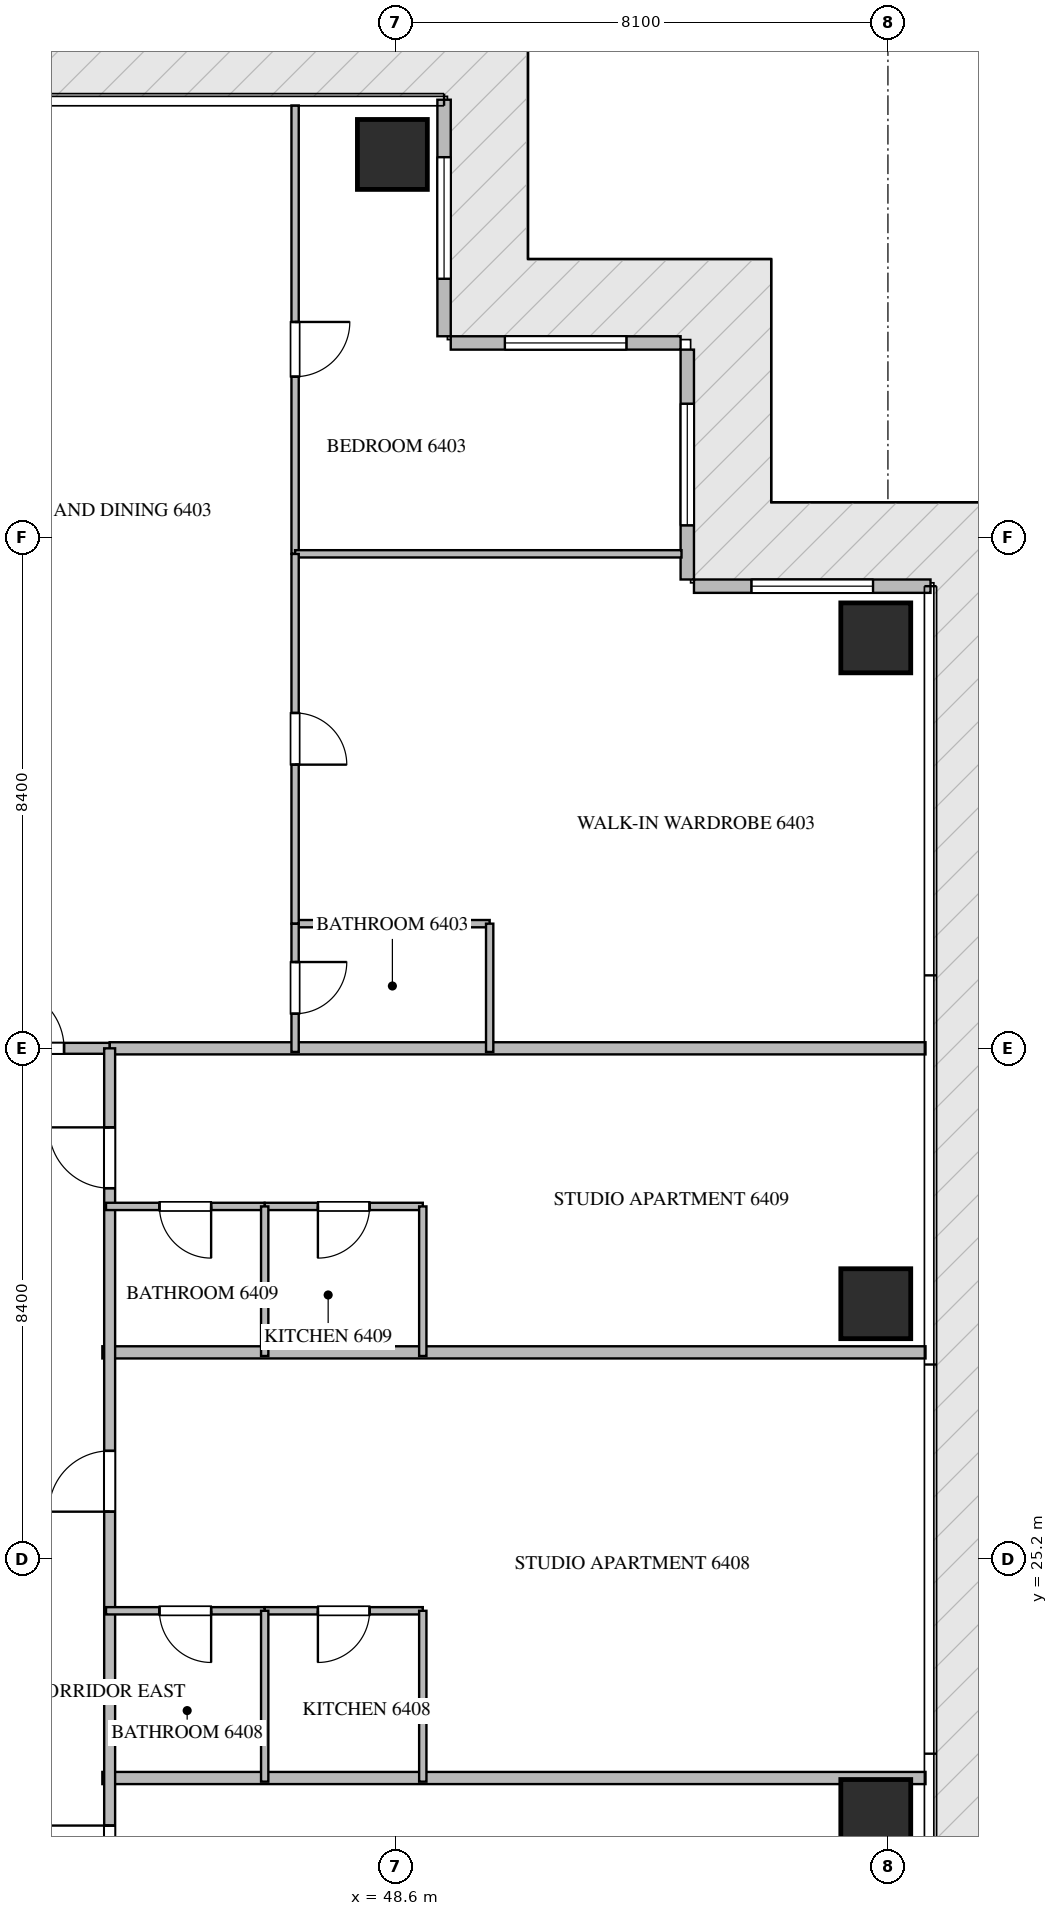
"""IFC4 building model, lengths in metres.
Left out: names, types, materials, properties, quantities, classifications, styles, units other than length and angle.
Written with IfcOpenShell. Run it as: python <this file> out.ifc"""

import sys

from ifc_helpers import new_model, si_unit, direction, frame, frame_2d, origin, origin_2d, place, context, subcontext, project, spatial, rectangle, extrude, source, transform, mapped, element, fill, save


model = new_model("IFC4")
c1 = context("Model", 3, precision=1e-05, world=origin(), true_north=direction((0.0, 1.0)))
c2 = subcontext(c1, "Body", "Model", "MODEL_VIEW")
j1 = project(units=[si_unit("LENGTHUNIT", "METRE"), si_unit("PLANEANGLEUNIT", "RADIAN")], contexts=[c1])
p1 = place(None, origin())
s1 = spatial("IfcSite", under=j1, at=p1, CompositionType="ELEMENT")
p2 = place(p1, origin())
s2 = spatial("IfcBuilding", under=s1, at=p2, CompositionType="ELEMENT")
p3 = place(p2, frame((0.0, 0.0, 256.65)))
s3 = spatial("IfcBuildingStorey", under=s2, at=p3, CompositionType="ELEMENT", Elevation=256.65)
m1 = source(origin(), c2, "Body", "SweptSolid", [
    extrude(rectangle(XDim=1.15, YDim=1.15, at=origin_2d()), origin(), (0.0, 0.0, 1.0), 3.85),
])
for number, where, z_axis, x_axis in (
    (1, (48.55, 48.3, -0.26), (0.0, 0.0, 1.0), (1.0, 0.0, 0.0)),
    (2, (56.5, 21.0, -0.26), (0.0, 0.0, 1.0), (1.0, 0.0, 0.0)),
    (3, (56.5, 29.4, -0.26), (0.0, 0.0, 1.0), (1.0, 0.0, 0.0)),
    (4, (56.5, 40.35, -0.26), (0.0, 0.0, 1.0), (1.0, 0.0, 0.0)),
):
    element("IfcColumn", number, at=place(p3, frame(where, z_axis=z_axis, x_axis=x_axis)), inside=s3, PredefinedType="COLUMN", context=c2, shape_type="MappedRepresentation", body=[
        mapped(m1, transform((0.0, 0.0, 0.0), scale=1.0)),
    ])
p4 = place(p3, frame((57.4, 41.2, 0.0), z_axis=(0.0, 0.0, 1.0), x_axis=(-1.0, 0.0, 0.0)))
e5 = element("IfcWall", 5, at=p4, inside=s3, PredefinedType="ELEMENTEDWALL", context=c2, shape_type="SweptSolid", body=[
    extrude(rectangle(XDim=3.89, YDim=0.22, at=frame_2d((1.945, 0.0))), origin(), (0.0, 0.0, 1.0), 3.575),
])
p5 = place(p4, frame((0.945, 0.0, 0.65)))
e6 = element("IfcOpeningElement", 6, at=p5, cuts=e5, PredefinedType="OPENING", context=c2, shape_type="SweptSolid", body=[
    extrude(rectangle(XDim=2.0, YDim=2.2, at=frame_2d((1.0, 1.1))), frame((0.0, 0.12, 0.0), z_axis=(0.0, -1.0, 0.0), x_axis=(1.0, 0.0, 0.0)), (0.0, 0.0, 1.0), 0.24),
])
p6 = place(p3, frame((53.4, 41.31, 0.0), z_axis=(0.0, 0.0, 1.0), x_axis=(0.0, 1.0, 0.0)))
e7 = element("IfcWall", 7, at=p6, inside=s3, PredefinedType="ELEMENTEDWALL", context=c2, shape_type="SweptSolid", body=[
    extrude(rectangle(XDim=3.78, YDim=0.22, at=frame_2d((1.89, 0.0))), origin(), (0.0, 0.0, 1.0), 3.575),
])
p7 = place(p6, frame((0.89, 0.0, 0.65)))
e8 = element("IfcOpeningElement", 8, at=p7, cuts=e7, PredefinedType="OPENING", context=c2, shape_type="SweptSolid", body=[
    extrude(rectangle(XDim=2.0, YDim=2.2, at=frame_2d((1.0, 1.1))), frame((0.0, 0.12, 0.0), z_axis=(0.0, -1.0, 0.0), x_axis=(1.0, 0.0, 0.0)), (0.0, 0.0, 1.0), 0.24),
])
p8 = place(p3, frame((53.29, 45.2, 0.0), z_axis=(0.0, 0.0, 1.0), x_axis=(-1.0, 0.0, 0.0)))
e9 = element("IfcWall", 9, at=p8, inside=s3, PredefinedType="ELEMENTEDWALL", context=c2, shape_type="SweptSolid", body=[
    extrude(rectangle(XDim=3.78, YDim=0.22, at=frame_2d((1.89, 0.0))), origin(), (0.0, 0.0, 1.0), 3.575),
])
p9 = place(p8, frame((0.89, 0.0, 0.65)))
e10 = element("IfcOpeningElement", 10, at=p9, cuts=e9, PredefinedType="OPENING", context=c2, shape_type="SweptSolid", body=[
    extrude(rectangle(XDim=2.0, YDim=2.2, at=frame_2d((1.0, 1.1))), frame((0.0, 0.12, 0.0), z_axis=(0.0, -1.0, 0.0), x_axis=(1.0, 0.0, 0.0)), (0.0, 0.0, 1.0), 0.24),
])
p10 = place(p3, frame((49.4, 45.31, 0.0), z_axis=(0.0, 0.0, 1.0), x_axis=(0.0, 1.0, 0.0)))
e11 = element("IfcWall", 11, at=p10, inside=s3, PredefinedType="ELEMENTEDWALL", context=c2, shape_type="SweptSolid", body=[
    extrude(rectangle(XDim=3.89, YDim=0.22, at=frame_2d((1.945, 0.0))), origin(), (0.0, 0.0, 1.0), 3.575),
])
p11 = place(p10, frame((0.945, 0.0, 0.65)))
e12 = element("IfcOpeningElement", 12, at=p11, cuts=e11, PredefinedType="OPENING", context=c2, shape_type="SweptSolid", body=[
    extrude(rectangle(XDim=2.0, YDim=2.2, at=frame_2d((1.0, 1.1))), frame((0.0, 0.12, 0.0), z_axis=(0.0, -1.0, 0.0), x_axis=(1.0, 0.0, 0.0)), (0.0, 0.0, 1.0), 0.24),
])
for number, where, z_axis, x_axis in (
    (13, (43.78, 21.6, 0.0), (0.0, 0.0, 1.0), (1.0, 0.0, 0.0)),
    (14, (43.78, 28.6, 0.0), (0.0, 0.0, 1.0), (1.0, 0.0, 0.0)),
):
    element("IfcWall", number, at=place(p3, frame(where, z_axis=z_axis, x_axis=x_axis)), inside=s3, PredefinedType="PARTITIONING", context=c2, shape_type="SweptSolid", body=[
        extrude(rectangle(XDim=13.538, YDim=0.2, at=frame_2d((6.769, 0.0))), origin(), (0.0, 0.0, 1.0), 3.59),
    ])
p12 = place(p3, frame((43.9, 33.6, 0.0), z_axis=(0.0, 0.0, 1.0), x_axis=(1.0, 0.0, 0.0)))
e15 = element("IfcWall", 15, at=p12, inside=s3, PredefinedType="PARTITIONING", context=c2, shape_type="SweptSolid", body=[
    extrude(rectangle(XDim=13.418, YDim=0.2, at=frame_2d((6.709, 0.0))), origin(), (0.0, 0.0, 1.0), 3.59),
])
p13 = place(p3, frame((41.402, 33.6, 0.0), z_axis=(0.0, 0.0, 1.0), x_axis=(1.0, 0.0, 0.0)))
e16 = element("IfcWall", 16, at=p13, inside=s3, PredefinedType="PARTITIONING", context=c2, shape_type="SweptSolid", body=[
    extrude(rectangle(XDim=2.496, YDim=0.18, at=frame_2d((1.248, 0.0))), origin(), (0.0, 0.0, 1.0), 3.59),
])
p14 = place(p13, frame((0.748, 0.0, 0.0)))
e17 = element("IfcOpeningElement", 17, at=p14, cuts=e16, PredefinedType="OPENING", context=c2, shape_type="SweptSolid", body=[
    extrude(rectangle(XDim=1.0, YDim=2.15, at=frame_2d((0.5, 1.075))), frame((0.0, 0.1, 0.0), z_axis=(0.0, -1.0, 0.0), x_axis=(1.0, 0.0, 0.0)), (0.0, 0.0, 1.0), 0.2),
])
p15 = place(p3, frame((43.9, 16.8, 0.0), z_axis=(0.0, 0.0, 1.0), x_axis=(0.0, 1.0, 0.0)))
e18 = element("IfcWall", 18, at=p15, inside=s3, PredefinedType="PARTITIONING", context=c2, shape_type="SweptSolid", body=[
    extrude(rectangle(XDim=16.8, YDim=0.18, at=frame_2d((8.4, 0.0))), origin(), (0.0, 0.0, 1.0), 3.59),
])
p16 = place(p15, frame((3.018, 0.0, 0.0)))
e19 = element("IfcOpeningElement", 19, at=p16, cuts=e18, PredefinedType="OPENING", context=c2, shape_type="SweptSolid", body=[
    extrude(rectangle(XDim=1.0, YDim=2.15, at=frame_2d((0.5, 1.075))), frame((0.0, 0.1, 0.0), z_axis=(0.0, -1.0, 0.0), x_axis=(1.0, 0.0, 0.0)), (0.0, 0.0, 1.0), 0.2),
])
p17 = place(p15, frame((9.18, 0.0, 0.0)))
e20 = element("IfcOpeningElement", 20, at=p17, cuts=e18, PredefinedType="OPENING", context=c2, shape_type="SweptSolid", body=[
    extrude(rectangle(XDim=1.0, YDim=2.15, at=frame_2d((0.5, 1.075))), frame((0.0, 0.1, 0.0), z_axis=(0.0, -1.0, 0.0), x_axis=(1.0, 0.0, 0.0)), (0.0, 0.0, 1.0), 0.2),
])
p18 = place(p15, frame((14.5, 0.0, 0.0)))
e21 = element("IfcOpeningElement", 21, at=p18, cuts=e18, PredefinedType="OPENING", context=c2, shape_type="SweptSolid", body=[
    extrude(rectangle(XDim=1.0, YDim=2.15, at=frame_2d((0.5, 1.075))), frame((0.0, 0.1, 0.0), z_axis=(0.0, -1.0, 0.0), x_axis=(1.0, 0.0, 0.0)), (0.0, 0.0, 1.0), 0.2),
])
p19 = place(p3, frame((46.95, 49.105, 0.0), z_axis=(0.0, 0.0, 1.0), x_axis=(0.0, -1.0, 0.0)))
e22 = element("IfcWall", 22, at=p19, inside=s3, PredefinedType="PARTITIONING", context=c2, shape_type="SweptSolid", body=[
    extrude(rectangle(XDim=7.373, YDim=0.12, at=frame_2d((3.687, 0.0))), origin(), (0.0, 0.0, 1.0), 3.59),
])
p20 = place(p19, frame((3.56, 0.0, 0.0)))
e23 = element("IfcOpeningElement", 23, at=p20, cuts=e22, PredefinedType="OPENING", context=c2, shape_type="SweptSolid", body=[
    extrude(rectangle(XDim=0.9, YDim=2.1, at=frame_2d((0.45, 1.05))), frame((0.0, 0.07, 0.0), z_axis=(0.0, -1.0, 0.0), x_axis=(1.0, 0.0, 0.0)), (0.0, 0.0, 1.0), 0.14),
])
p21 = place(p3, frame((46.95, 41.732, 0.0), z_axis=(0.0, 0.0, 1.0), x_axis=(1.0, 0.0, 0.0)))
e24 = element("IfcWall", 24, at=p21, inside=s3, PredefinedType="PARTITIONING", context=c2, shape_type="SweptSolid", body=[
    extrude(rectangle(XDim=6.355, YDim=0.12, at=frame_2d((3.177, 0.0))), origin(), (0.0, 0.0, 1.0), 3.59),
])
p22 = place(p3, frame((46.95, 35.65, 0.0), z_axis=(0.0, 0.0, 1.0), x_axis=(1.0, 0.0, 0.0)))
e25 = element("IfcWall", 25, at=p22, inside=s3, PredefinedType="PARTITIONING", context=c2, shape_type="SweptSolid", body=[
    extrude(rectangle(XDim=3.2, YDim=0.12, at=frame_2d((1.6, 0.0))), origin(), (0.0, 0.0, 1.0), 3.59),
])
p23 = place(p3, frame((50.15, 35.65, 0.0), z_axis=(0.0, 0.0, 1.0), x_axis=(0.0, -1.0, 0.0)))
e26 = element("IfcWall", 26, at=p23, inside=s3, PredefinedType="PARTITIONING", context=c2, shape_type="SweptSolid", body=[
    extrude(rectangle(XDim=2.11, YDim=0.12, at=frame_2d((1.055, 0.0))), origin(), (0.0, 0.0, 1.0), 3.59),
])
p24 = place(p3, frame((46.95, 41.73, 0.0), z_axis=(0.0, 0.0, 1.0), x_axis=(0.0, -1.0, 0.0)))
e27 = element("IfcWall", 27, at=p24, inside=s3, PredefinedType="PARTITIONING", context=c2, shape_type="SweptSolid", body=[
    extrude(rectangle(XDim=6.08, YDim=0.12, at=frame_2d((3.04, 0.0))), origin(), (0.0, 0.0, 1.0), 3.59),
])
p25 = place(p24, frame((2.615, 0.0, 0.0)))
e28 = element("IfcOpeningElement", 28, at=p25, cuts=e27, PredefinedType="OPENING", context=c2, shape_type="SweptSolid", body=[
    extrude(rectangle(XDim=0.85, YDim=2.1, at=frame_2d((0.425, 1.05))), frame((0.0, 0.07, 0.0), z_axis=(0.0, -1.0, 0.0), x_axis=(1.0, 0.0, 0.0)), (0.0, 0.0, 1.0), 0.14),
])
p26 = place(p3, frame((46.95, 35.648, 0.0), z_axis=(0.0, 0.0, 1.0), x_axis=(0.0, -1.0, 0.0)))
e29 = element("IfcWall", 29, at=p26, inside=s3, PredefinedType="PARTITIONING", context=c2, shape_type="SweptSolid", body=[
    extrude(rectangle(XDim=2.108, YDim=0.12, at=frame_2d((1.054, 0.0))), origin(), (0.0, 0.0, 1.0), 3.59),
])
p27 = place(p26, frame((0.629, 0.0, 0.0)))
e30 = element("IfcOpeningElement", 30, at=p27, cuts=e29, PredefinedType="OPENING", context=c2, shape_type="SweptSolid", body=[
    extrude(rectangle(XDim=0.85, YDim=2.1, at=frame_2d((0.425, 1.05))), frame((0.0, 0.07, 0.0), z_axis=(0.0, -1.0, 0.0), x_axis=(1.0, 0.0, 0.0)), (0.0, 0.0, 1.0), 0.14),
])
p28 = place(p3, frame((49.05, 24.35, 0.0), z_axis=(0.0, 0.0, 1.0), x_axis=(-1.0, 0.0, 0.0)))
e31 = element("IfcWall", 31, at=p28, inside=s3, PredefinedType="PARTITIONING", context=c2, shape_type="SweptSolid", body=[
    extrude(rectangle(XDim=2.6, YDim=0.12, at=frame_2d((1.3, 0.0))), origin(), (0.0, 0.0, 1.0), 3.59),
])
p29 = place(p28, frame((0.875, 0.0, 0.0)))
e32 = element("IfcOpeningElement", 32, at=p29, cuts=e31, PredefinedType="OPENING", context=c2, shape_type="SweptSolid", body=[
    extrude(rectangle(XDim=0.85, YDim=2.1, at=frame_2d((0.425, 1.05))), frame((0.0, 0.07, 0.0), z_axis=(0.0, -1.0, 0.0), x_axis=(1.0, 0.0, 0.0)), (0.0, 0.0, 1.0), 0.14),
])
p30 = place(p3, frame((46.448, 24.35, 0.0), z_axis=(0.0, 0.0, 1.0), x_axis=(-1.0, 0.0, 0.0)))
e33 = element("IfcWall", 33, at=p30, inside=s3, PredefinedType="PARTITIONING", context=c2, shape_type="SweptSolid", body=[
    extrude(rectangle(XDim=2.608, YDim=0.12, at=frame_2d((1.304, 0.0))), origin(), (0.0, 0.0, 1.0), 3.59),
])
p31 = place(p30, frame((0.879, 0.0, 0.0)))
e34 = element("IfcOpeningElement", 34, at=p31, cuts=e33, PredefinedType="OPENING", context=c2, shape_type="SweptSolid", body=[
    extrude(rectangle(XDim=0.85, YDim=2.1, at=frame_2d((0.425, 1.05))), frame((0.0, 0.07, 0.0), z_axis=(0.0, -1.0, 0.0), x_axis=(1.0, 0.0, 0.0)), (0.0, 0.0, 1.0), 0.14),
])
for number, where, z_axis, x_axis in (
    (35, (46.45, 21.54, 0.0), (0.0, 0.0, 1.0), (0.0, 1.0, 0.0)),
    (36, (49.05, 21.54, 0.0), (0.0, 0.0, 1.0), (0.0, 1.0, 0.0)),
):
    element("IfcWall", number, at=place(p3, frame(where, z_axis=z_axis, x_axis=x_axis)), inside=s3, PredefinedType="PARTITIONING", context=c2, shape_type="SweptSolid", body=[
        extrude(rectangle(XDim=2.81, YDim=0.12, at=frame_2d((1.405, 0.0))), origin(), (0.0, 0.0, 1.0), 3.59),
    ])
p32 = place(p3, frame((49.05, 31.0, 0.0), z_axis=(0.0, 0.0, 1.0), x_axis=(-1.0, 0.0, 0.0)))
e37 = element("IfcWall", 37, at=p32, inside=s3, PredefinedType="PARTITIONING", context=c2, shape_type="SweptSolid", body=[
    extrude(rectangle(XDim=2.6, YDim=0.12, at=frame_2d((1.3, 0.0))), origin(), (0.0, 0.0, 1.0), 3.59),
])
p33 = place(p32, frame((0.875, 0.0, 0.0)))
e38 = element("IfcOpeningElement", 38, at=p33, cuts=e37, PredefinedType="OPENING", context=c2, shape_type="SweptSolid", body=[
    extrude(rectangle(XDim=0.85, YDim=2.1, at=frame_2d((0.425, 1.05))), frame((0.0, 0.07, 0.0), z_axis=(0.0, -1.0, 0.0), x_axis=(1.0, 0.0, 0.0)), (0.0, 0.0, 1.0), 0.14),
])
p34 = place(p3, frame((46.448, 31.0, 0.0), z_axis=(0.0, 0.0, 1.0), x_axis=(-1.0, 0.0, 0.0)))
e39 = element("IfcWall", 39, at=p34, inside=s3, PredefinedType="PARTITIONING", context=c2, shape_type="SweptSolid", body=[
    extrude(rectangle(XDim=2.608, YDim=0.12, at=frame_2d((1.304, 0.0))), origin(), (0.0, 0.0, 1.0), 3.59),
])
p35 = place(p34, frame((0.879, 0.0, 0.0)))
e40 = element("IfcOpeningElement", 40, at=p35, cuts=e39, PredefinedType="OPENING", context=c2, shape_type="SweptSolid", body=[
    extrude(rectangle(XDim=0.85, YDim=2.1, at=frame_2d((0.425, 1.05))), frame((0.0, 0.07, 0.0), z_axis=(0.0, -1.0, 0.0), x_axis=(1.0, 0.0, 0.0)), (0.0, 0.0, 1.0), 0.14),
])
for number, where, z_axis, x_axis in (
    (41, (46.45, 28.54, 0.0), (0.0, 0.0, 1.0), (0.0, 1.0, 0.0)),
    (42, (49.05, 28.54, 0.0), (0.0, 0.0, 1.0), (0.0, 1.0, 0.0)),
):
    element("IfcWall", number, at=place(p3, frame(where, z_axis=z_axis, x_axis=x_axis)), inside=s3, PredefinedType="PARTITIONING", context=c2, shape_type="SweptSolid", body=[
        extrude(rectangle(XDim=2.46, YDim=0.12, at=frame_2d((1.23, 0.0))), origin(), (0.0, 0.0, 1.0), 3.59),
    ])
m2 = source(origin(), c2, "Body", "SweptSolid", [
    extrude(rectangle(XDim=2.0, YDim=2.2, at=frame_2d((1.0, 1.1))), frame((0.0, 0.03, 0.0), z_axis=(0.0, -1.0, 0.0), x_axis=(1.0, 0.0, 0.0)), (0.0, 0.0, 1.0), 0.06),
])
p36 = place(p5, origin())
e43 = element("IfcWindow", 43, at=p36, inside=s3, PartitioningType="SINGLE_PANEL", PredefinedType="WINDOW", context=c2, shape_type="MappedRepresentation", body=[
    mapped(m2, transform((0.0, 0.0, 0.0), scale=1.0)),
])
fill(e6, e43)
p37 = place(p7, origin())
e44 = element("IfcWindow", 44, at=p37, inside=s3, PartitioningType="SINGLE_PANEL", PredefinedType="WINDOW", context=c2, shape_type="MappedRepresentation", body=[
    mapped(m2, transform((0.0, 0.0, 0.0), scale=1.0)),
])
fill(e8, e44)
p38 = place(p9, origin())
e45 = element("IfcWindow", 45, at=p38, inside=s3, PartitioningType="SINGLE_PANEL", PredefinedType="WINDOW", context=c2, shape_type="MappedRepresentation", body=[
    mapped(m2, transform((0.0, 0.0, 0.0), scale=1.0)),
])
fill(e10, e45)
p39 = place(p11, origin())
e46 = element("IfcWindow", 46, at=p39, inside=s3, PartitioningType="SINGLE_PANEL", PredefinedType="WINDOW", context=c2, shape_type="MappedRepresentation", body=[
    mapped(m2, transform((0.0, 0.0, 0.0), scale=1.0)),
])
fill(e12, e46)
m3 = source(origin(), c2, "Body", "SweptSolid", [
    extrude(rectangle(XDim=1.0, YDim=2.15, at=frame_2d((0.5, 1.075))), frame((0.0, 0.025, 0.0), z_axis=(0.0, -1.0, 0.0), x_axis=(1.0, 0.0, 0.0)), (0.0, 0.0, 1.0), 0.05),
])
p40 = place(p14, origin())
e47 = element("IfcDoor", 47, at=p40, inside=s3, OperationType="SINGLE_SWING_LEFT", PredefinedType="DOOR", context=c2, shape_type="MappedRepresentation", body=[
    mapped(m3, transform((0.0, 0.0, 0.0), scale=1.0)),
])
fill(e17, e47)
p41 = place(p16, origin())
e48 = element("IfcDoor", 48, at=p41, inside=s3, OperationType="SINGLE_SWING_RIGHT", PredefinedType="DOOR", context=c2, shape_type="MappedRepresentation", body=[
    mapped(m3, transform((0.0, 0.0, 0.0), scale=1.0)),
])
fill(e19, e48)
p42 = place(p17, origin())
e49 = element("IfcDoor", 49, at=p42, inside=s3, OperationType="SINGLE_SWING_LEFT", PredefinedType="DOOR", context=c2, shape_type="MappedRepresentation", body=[
    mapped(m3, transform((0.0, 0.0, 0.0), scale=1.0)),
])
fill(e20, e49)
p43 = place(p18, origin())
e50 = element("IfcDoor", 50, at=p43, inside=s3, OperationType="SINGLE_SWING_RIGHT", PredefinedType="DOOR", context=c2, shape_type="MappedRepresentation", body=[
    mapped(m3, transform((0.0, 0.0, 0.0), scale=1.0)),
])
fill(e21, e50)
m4 = source(origin(), c2, "Body", "SweptSolid", [
    extrude(rectangle(XDim=0.9, YDim=2.1, at=frame_2d((0.45, 1.05))), frame((0.0, 0.025, 0.0), z_axis=(0.0, -1.0, 0.0), x_axis=(1.0, 0.0, 0.0)), (0.0, 0.0, 1.0), 0.05),
])
p44 = place(p20, origin())
e51 = element("IfcDoor", 51, at=p44, inside=s3, OperationType="SINGLE_SWING_LEFT", PredefinedType="DOOR", context=c2, shape_type="MappedRepresentation", body=[
    mapped(m4, transform((0.0, 0.0, 0.0), scale=1.0)),
])
fill(e23, e51)
m5 = source(origin(), c2, "Body", "SweptSolid", [
    extrude(rectangle(XDim=0.85, YDim=2.1, at=frame_2d((0.425, 1.05))), frame((0.0, 0.025, 0.0), z_axis=(0.0, -1.0, 0.0), x_axis=(1.0, 0.0, 0.0)), (0.0, 0.0, 1.0), 0.05),
])
p45 = place(p25, origin())
e52 = element("IfcDoor", 52, at=p45, inside=s3, OperationType="SINGLE_SWING_RIGHT", PredefinedType="DOOR", context=c2, shape_type="MappedRepresentation", body=[
    mapped(m5, transform((0.0, 0.0, 0.0), scale=1.0)),
])
fill(e28, e52)
p46 = place(p27, origin())
e53 = element("IfcDoor", 53, at=p46, inside=s3, OperationType="SINGLE_SWING_LEFT", PredefinedType="DOOR", context=c2, shape_type="MappedRepresentation", body=[
    mapped(m5, transform((0.0, 0.0, 0.0), scale=1.0)),
])
fill(e30, e53)
p47 = place(p29, origin())
e54 = element("IfcDoor", 54, at=p47, inside=s3, OperationType="SINGLE_SWING_RIGHT", PredefinedType="DOOR", context=c2, shape_type="MappedRepresentation", body=[
    mapped(m5, transform((0.0, 0.0, 0.0), scale=1.0)),
])
fill(e32, e54)
p48 = place(p31, origin())
e55 = element("IfcDoor", 55, at=p48, inside=s3, OperationType="SINGLE_SWING_LEFT", PredefinedType="DOOR", context=c2, shape_type="MappedRepresentation", body=[
    mapped(m5, transform((0.0, 0.0, 0.0), scale=1.0)),
])
fill(e34, e55)
p49 = place(p33, origin())
e56 = element("IfcDoor", 56, at=p49, inside=s3, OperationType="SINGLE_SWING_RIGHT", PredefinedType="DOOR", context=c2, shape_type="MappedRepresentation", body=[
    mapped(m5, transform((0.0, 0.0, 0.0), scale=1.0)),
])
fill(e38, e56)
p50 = place(p35, origin())
e57 = element("IfcDoor", 57, at=p50, inside=s3, OperationType="SINGLE_SWING_LEFT", PredefinedType="DOOR", context=c2, shape_type="MappedRepresentation", body=[
    mapped(m5, transform((0.0, 0.0, 0.0), scale=1.0)),
])
fill(e40, e57)
save(model, sys.argv[1])
